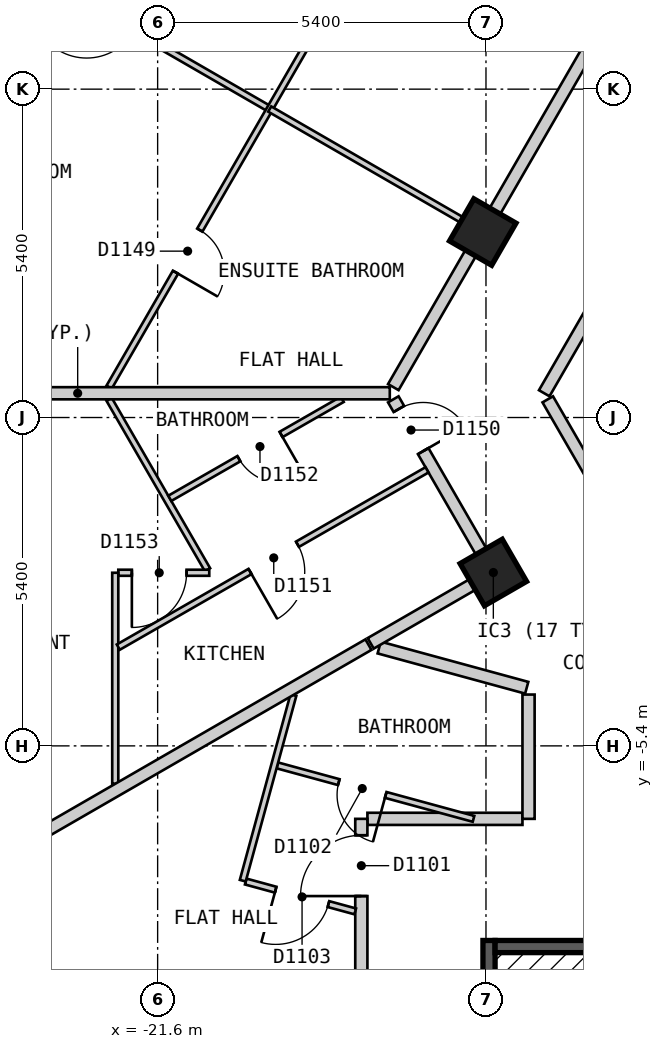
"""IFC4 building model, lengths in metres.
Left out: names, types, materials, properties, quantities, classifications, styles, units other than length and angle.
Written with IfcOpenShell. Run it as: python <this file> out.ifc"""

import sys

from ifc_helpers import new_model, si_unit, direction, frame, frame_2d, origin, origin_2d, place, context, subcontext, project, spatial, polyline, rectangle, outline, extrude, element, fill, save


model = new_model("IFC4")
c1 = context("Model", 3, precision=1e-05, world=origin(), true_north=direction((0.0, 1.0)))
c2 = subcontext(c1, "Body", "Model", "MODEL_VIEW")
j1 = project(units=[si_unit("LENGTHUNIT", "METRE"), si_unit("PLANEANGLEUNIT", "RADIAN")], contexts=[c1])
p1 = place(None, origin())
s1 = spatial("IfcSite", under=j1, at=p1, CompositionType="ELEMENT")
p2 = place(p1, origin())
s2 = spatial("IfcBuilding", under=s1, at=p2, CompositionType="ELEMENT")
p3 = place(p2, frame((0.0, 0.0, 144.6)))
s3 = spatial("IfcBuildingStorey", under=s2, at=p3, CompositionType="ELEMENT", Elevation=144.6)
for number, where, z_axis, x_axis in (
    (1, (-16.079, -2.549, 0.0), (0.0, 0.0, 1.0), (0.5, -0.866, 0.0)),
    (2, (-16.253, 3.05, 0.0), (0.0, 0.0, 1.0), (-0.5, -0.866, 0.0)),
):
    element("IfcColumn", number, at=place(p3, frame(where, z_axis=z_axis, x_axis=x_axis)), inside=s3, PredefinedType="COLUMN", context=c2, shape_type="SweptSolid", body=[
        extrude(rectangle(XDim=0.8, YDim=0.8, at=origin_2d()), origin(), (0.0, 0.0, 1.0), 3.0),
    ])
p4 = place(p3, frame((-16.555, 23.025, 0.0), z_axis=(0.0, 0.0, 1.0), x_axis=(-0.500020536353, -0.866013546791, 0.0)))
e3 = element("IfcWall", 3, at=p4, inside=s3, PredefinedType="SOLIDWALL", context=c2, shape_type="SweptSolid", body=[
    extrude(outline(polyline([(0.0, -0.15), (23.325, -0.15), (23.245, 0.15), (0.08, 0.15), (0.0, -0.15)])), origin(), (0.0, 0.0, 1.0), 2.7),
])
p5 = place(p4, frame((1.314, 0.0, 0.15)))
e4 = element("IfcOpeningElement", 4, at=p5, cuts=e3, PredefinedType="OPENING", context=c2, shape_type="SweptSolid", body=[
    extrude(rectangle(XDim=1.5, YDim=2.1, at=frame_2d((0.75, 1.05))), frame((0.0, 0.16, 0.0), z_axis=(0.0, -1.0, 0.0), x_axis=(1.0, 0.0, 0.0)), (0.0, 0.0, 1.0), 0.32),
])
p6 = place(p4, frame((4.056, 0.0, 0.15)))
e5 = element("IfcOpeningElement", 5, at=p6, cuts=e3, PredefinedType="OPENING", context=c2, shape_type="SweptSolid", body=[
    extrude(rectangle(XDim=1.5, YDim=2.1, at=frame_2d((0.75, 1.05))), frame((0.0, 0.16, 0.0), z_axis=(0.0, -1.0, 0.0), x_axis=(1.0, 0.0, 0.0)), (0.0, 0.0, 1.0), 0.32),
])
p7 = place(p4, frame((6.799, 0.0, 0.15)))
e6 = element("IfcOpeningElement", 6, at=p7, cuts=e3, PredefinedType="OPENING", context=c2, shape_type="SweptSolid", body=[
    extrude(rectangle(XDim=1.5, YDim=2.1, at=frame_2d((0.75, 1.05))), frame((0.0, 0.16, 0.0), z_axis=(0.0, -1.0, 0.0), x_axis=(1.0, 0.0, 0.0)), (0.0, 0.0, 1.0), 0.32),
])
p8 = place(p4, frame((9.541, 0.0, 0.15)))
e7 = element("IfcOpeningElement", 7, at=p8, cuts=e3, PredefinedType="OPENING", context=c2, shape_type="SweptSolid", body=[
    extrude(rectangle(XDim=1.5, YDim=2.1, at=frame_2d((0.75, 1.05))), frame((0.0, 0.16, 0.0), z_axis=(0.0, -1.0, 0.0), x_axis=(1.0, 0.0, 0.0)), (0.0, 0.0, 1.0), 0.32),
])
p9 = place(p4, frame((12.285, 0.0, 0.15)))
e8 = element("IfcOpeningElement", 8, at=p9, cuts=e3, PredefinedType="OPENING", context=c2, shape_type="SweptSolid", body=[
    extrude(rectangle(XDim=1.5, YDim=2.1, at=frame_2d((0.75, 1.05))), frame((0.0, 0.16, 0.0), z_axis=(0.0, -1.0, 0.0), x_axis=(1.0, 0.0, 0.0)), (0.0, 0.0, 1.0), 0.32),
])
p10 = place(p4, frame((15.027, 0.0, 0.15)))
e9 = element("IfcOpeningElement", 9, at=p10, cuts=e3, PredefinedType="OPENING", context=c2, shape_type="SweptSolid", body=[
    extrude(rectangle(XDim=1.5, YDim=2.1, at=frame_2d((0.75, 1.05))), frame((0.0, 0.16, 0.0), z_axis=(0.0, -1.0, 0.0), x_axis=(1.0, 0.0, 0.0)), (0.0, 0.0, 1.0), 0.32),
])
p11 = place(p4, frame((17.769, 0.0, 0.15)))
e10 = element("IfcOpeningElement", 10, at=p11, cuts=e3, PredefinedType="OPENING", context=c2, shape_type="SweptSolid", body=[
    extrude(rectangle(XDim=1.5, YDim=2.1, at=frame_2d((0.75, 1.05))), frame((0.0, 0.16, 0.0), z_axis=(0.0, -1.0, 0.0), x_axis=(1.0, 0.0, 0.0)), (0.0, 0.0, 1.0), 0.32),
])
p12 = place(p4, frame((20.512, 0.0, 0.15)))
e11 = element("IfcOpeningElement", 11, at=p12, cuts=e3, PredefinedType="OPENING", context=c2, shape_type="SweptSolid", body=[
    extrude(rectangle(XDim=1.5, YDim=2.1, at=frame_2d((0.75, 1.05))), frame((0.0, 0.16, 0.0), z_axis=(0.0, -1.0, 0.0), x_axis=(1.0, 0.0, 0.0)), (0.0, 0.0, 1.0), 0.32),
])
p13 = place(p3, frame((-28.218, -2.025, 0.0), z_axis=(0.0, 0.0, 1.0), x_axis=(0.500017503135, -0.866015298109, 0.0)))
e12 = element("IfcWall", 12, at=p13, inside=s3, PredefinedType="SOLIDWALL", context=c2, shape_type="SweptSolid", body=[
    extrude(outline(polyline([(0.0, -0.15), (24.711, -0.15), (24.631, 0.15), (0.08, 0.15), (0.0, -0.15)])), origin(), (0.0, 0.0, 1.0), 2.7),
])
p14 = place(p13, frame((1.4, 0.0, 0.15)))
e13 = element("IfcOpeningElement", 13, at=p14, cuts=e12, PredefinedType="OPENING", context=c2, shape_type="SweptSolid", body=[
    extrude(rectangle(XDim=1.5, YDim=2.1, at=frame_2d((0.75, 1.05))), frame((0.0, 0.16, 0.0), z_axis=(0.0, -1.0, 0.0), x_axis=(1.0, 0.0, 0.0)), (0.0, 0.0, 1.0), 0.32),
])
p15 = place(p13, frame((4.316, 0.0, 0.15)))
e14 = element("IfcOpeningElement", 14, at=p15, cuts=e12, PredefinedType="OPENING", context=c2, shape_type="SweptSolid", body=[
    extrude(rectangle(XDim=1.5, YDim=2.1, at=frame_2d((0.75, 1.05))), frame((0.0, 0.16, 0.0), z_axis=(0.0, -1.0, 0.0), x_axis=(1.0, 0.0, 0.0)), (0.0, 0.0, 1.0), 0.32),
])
p16 = place(p13, frame((7.231, 0.0, 0.15)))
e15 = element("IfcOpeningElement", 15, at=p16, cuts=e12, PredefinedType="OPENING", context=c2, shape_type="SweptSolid", body=[
    extrude(rectangle(XDim=1.5, YDim=2.1, at=frame_2d((0.75, 1.05))), frame((0.0, 0.16, 0.0), z_axis=(0.0, -1.0, 0.0), x_axis=(1.0, 0.0, 0.0)), (0.0, 0.0, 1.0), 0.32),
])
p17 = place(p13, frame((10.147, 0.0, 0.15)))
e16 = element("IfcOpeningElement", 16, at=p17, cuts=e12, PredefinedType="OPENING", context=c2, shape_type="SweptSolid", body=[
    extrude(rectangle(XDim=1.5, YDim=2.1, at=frame_2d((0.75, 1.05))), frame((0.0, 0.16, 0.0), z_axis=(0.0, -1.0, 0.0), x_axis=(1.0, 0.0, 0.0)), (0.0, 0.0, 1.0), 0.32),
])
p18 = place(p13, frame((13.062, 0.0, 0.15)))
e17 = element("IfcOpeningElement", 17, at=p18, cuts=e12, PredefinedType="OPENING", context=c2, shape_type="SweptSolid", body=[
    extrude(rectangle(XDim=1.5, YDim=2.1, at=frame_2d((0.75, 1.05))), frame((0.0, 0.16, 0.0), z_axis=(0.0, -1.0, 0.0), x_axis=(1.0, 0.0, 0.0)), (0.0, 0.0, 1.0), 0.32),
])
p19 = place(p13, frame((15.977, 0.0, 0.15)))
e18 = element("IfcOpeningElement", 18, at=p19, cuts=e12, PredefinedType="OPENING", context=c2, shape_type="SweptSolid", body=[
    extrude(rectangle(XDim=1.5, YDim=2.1, at=frame_2d((0.75, 1.05))), frame((0.0, 0.16, 0.0), z_axis=(0.0, -1.0, 0.0), x_axis=(1.0, 0.0, 0.0)), (0.0, 0.0, 1.0), 0.32),
])
p20 = place(p13, frame((18.893, 0.0, 0.15)))
e19 = element("IfcOpeningElement", 19, at=p20, cuts=e12, PredefinedType="OPENING", context=c2, shape_type="SweptSolid", body=[
    extrude(rectangle(XDim=1.5, YDim=2.1, at=frame_2d((0.75, 1.05))), frame((0.0, 0.16, 0.0), z_axis=(0.0, -1.0, 0.0), x_axis=(1.0, 0.0, 0.0)), (0.0, 0.0, 1.0), 0.32),
])
p21 = place(p13, frame((21.809, 0.0, 0.15)))
e20 = element("IfcOpeningElement", 20, at=p21, cuts=e12, PredefinedType="OPENING", context=c2, shape_type="SweptSolid", body=[
    extrude(rectangle(XDim=1.5, YDim=2.1, at=frame_2d((0.75, 1.05))), frame((0.0, 0.16, 0.0), z_axis=(0.0, -1.0, 0.0), x_axis=(1.0, 0.0, 0.0)), (0.0, 0.0, 1.0), 0.32),
])
p22 = place(p3, frame((-15.184, 0.299, 0.0), z_axis=(0.0, 0.0, 1.0), x_axis=(0.500149577091, -0.865939028186, 0.0)))
e21 = element("IfcWall", 21, at=p22, inside=s3, PredefinedType="PARTITIONING", context=c2, shape_type="SweptSolid", body=[
    extrude(rectangle(XDim=3.463, YDim=0.2, at=frame_2d((1.732, 0.0))), origin(), (0.0, 0.0, 1.0), 2.7),
])
p23 = place(p3, frame((-17.724, 0.299, 0.0), z_axis=(0.0, 0.0, 1.0), x_axis=(0.499910220442, -0.866077231832, 0.0)))
e22 = element("IfcWall", 22, at=p23, inside=s3, PredefinedType="PARTITIONING", context=c2, shape_type="SweptSolid", body=[
    extrude(rectangle(XDim=3.189, YDim=0.2, at=frame_2d((1.594, 0.0))), origin(), (0.0, 0.0, 1.0), 2.7),
])
p24 = place(p23, frame((0.183, 0.0, 0.0)))
e23 = element("IfcOpeningElement", 23, at=p24, cuts=e22, PredefinedType="OPENING", context=c2, shape_type="SweptSolid", body=[
    extrude(rectangle(XDim=0.8, YDim=2.1, at=frame_2d((0.4, 1.05))), frame((0.0, 0.11, 0.0), z_axis=(0.0, -1.0, 0.0), x_axis=(1.0, 0.0, 0.0)), (0.0, 0.0, 1.0), 0.22),
])
p25 = place(p3, frame((-18.15, -6.6, 0.0), z_axis=(0.0, 0.0, 1.0), x_axis=(1.0, 0.0, 0.0)))
e24 = element("IfcWall", 24, at=p25, inside=s3, PredefinedType="PARTITIONING", context=c2, shape_type="SweptSolid", body=[
    extrude(rectangle(XDim=2.55, YDim=0.2, at=frame_2d((1.275, 0.0))), origin(), (0.0, 0.0, 1.0), 2.7),
])
p26 = place(p3, frame((-15.242, 0.399, 0.0), z_axis=(0.0, 0.0, 1.0), x_axis=(0.499953615651, 0.866052182145, 0.0)))
e25 = element("IfcWall", 25, at=p26, inside=s3, PredefinedType="PARTITIONING", context=c2, shape_type="SweptSolid", body=[
    extrude(rectangle(XDim=8.777, YDim=0.2, at=frame_2d((4.388, 0.0))), origin(), (0.0, 0.0, 1.0), 2.7),
])
p27 = place(p26, frame((3.938, 0.0, 0.0)))
e26 = element("IfcOpeningElement", 26, at=p27, cuts=e25, PredefinedType="OPENING", context=c2, shape_type="SweptSolid", body=[
    extrude(rectangle(XDim=0.9, YDim=2.1, at=frame_2d((0.45, 1.05))), frame((0.0, 0.11, 0.0), z_axis=(0.0, -1.0, 0.0), x_axis=(1.0, 0.0, 0.0)), (0.0, 0.0, 1.0), 0.22),
])
p28 = place(p3, frame((-17.724, 0.5, 0.0), z_axis=(0.0, 0.0, 1.0), x_axis=(0.499992388462, 0.866029798263, 0.0)))
e27 = element("IfcWall", 27, at=p28, inside=s3, PredefinedType="PARTITIONING", context=c2, shape_type="SweptSolid", body=[
    extrude(rectangle(XDim=16.859, YDim=0.2, at=frame_2d((8.429, 0.0))), origin(), (0.0, 0.0, 1.0), 2.7),
])
p29 = place(p28, frame((10.672, 0.0, 0.0)))
e28 = element("IfcOpeningElement", 28, at=p29, cuts=e27, PredefinedType="OPENING", context=c2, shape_type="SweptSolid", body=[
    extrude(rectangle(XDim=1.0, YDim=2.1, at=frame_2d((0.5, 1.05))), frame((0.0, 0.11, 0.0), z_axis=(0.0, -1.0, 0.0), x_axis=(1.0, 0.0, 0.0)), (0.0, 0.0, 1.0), 0.22),
])
p30 = place(p3, frame((-15.5, -6.6, 0.0), z_axis=(0.0, 0.0, 1.0), x_axis=(0.0, 1.0, 0.0)))
e29 = element("IfcWall", 29, at=p30, inside=s3, PredefinedType="PARTITIONING", context=c2, shape_type="SweptSolid", body=[
    extrude(rectangle(XDim=2.044, YDim=0.2, at=frame_2d((1.022, 0.0))), origin(), (0.0, 0.0, 1.0), 2.7),
])
p31 = place(p3, frame((-18.25, -10.478, 0.0), z_axis=(0.0, 0.0, 1.0), x_axis=(0.0, 1.0, 0.0)))
e30 = element("IfcWall", 30, at=p31, inside=s3, PredefinedType="PARTITIONING", context=c2, shape_type="SweptSolid", body=[
    extrude(rectangle(XDim=3.878, YDim=0.2, at=frame_2d((1.939, 0.0))), origin(), (0.0, 0.0, 1.0), 2.7),
])
p32 = place(p31, frame((2.608, 0.0, 0.0)))
e31 = element("IfcOpeningElement", 31, at=p32, cuts=e30, PredefinedType="OPENING", context=c2, shape_type="SweptSolid", body=[
    extrude(rectangle(XDim=1.0, YDim=2.1, at=frame_2d((0.5, 1.05))), frame((0.0, 0.11, 0.0), z_axis=(0.0, -1.0, 0.0), x_axis=(1.0, 0.0, 0.0)), (0.0, 0.0, 1.0), 0.22),
])
p33 = place(p3, frame((-22.398, 0.299, 0.0), z_axis=(0.0, 0.0, 1.0), x_axis=(0.50004249738, -0.86600086652, 0.0)))
e32 = element("IfcWall", 32, at=p33, inside=s3, PredefinedType="PARTITIONING", context=c2, shape_type="SweptSolid", body=[
    extrude(rectangle(XDim=3.236, YDim=0.1, at=frame_2d((1.618, 0.0))), origin(), (0.0, 0.0, 1.0), 2.7),
])
p34 = place(p3, frame((-19.631, -5.721, 0.0), z_axis=(0.0, 0.0, 1.0), x_axis=(0.964816035809, -0.262925877475, 0.0)))
e33 = element("IfcWall", 33, at=p34, inside=s3, PredefinedType="PARTITIONING", context=c2, shape_type="SweptSolid", body=[
    extrude(rectangle(XDim=3.344, YDim=0.1, at=frame_2d((1.672, 0.0))), origin(), (0.0, 0.0, 1.0), 2.7),
])
p35 = place(p34, frame((1.047, 0.0, 0.0)))
e34 = element("IfcOpeningElement", 34, at=p35, cuts=e33, PredefinedType="OPENING", context=c2, shape_type="SweptSolid", body=[
    extrude(rectangle(XDim=0.8, YDim=2.1, at=frame_2d((0.4, 1.05))), frame((0.0, 0.06, 0.0), z_axis=(0.0, -1.0, 0.0), x_axis=(1.0, 0.0, 0.0)), (0.0, 0.0, 1.0), 0.12),
])
p36 = place(p3, frame((-20.151, -7.631, 0.0), z_axis=(0.0, 0.0, 1.0), x_axis=(0.964784947449, -0.263039930765, 0.0)))
e35 = element("IfcWall", 35, at=p36, inside=s3, PredefinedType="PARTITIONING", context=c2, shape_type="SweptSolid", body=[
    extrude(rectangle(XDim=1.866, YDim=0.1, at=frame_2d((0.933, 0.0))), origin(), (0.0, 0.0, 1.0), 2.7),
])
p37 = place(p36, frame((0.51, 0.0, 0.0)))
e36 = element("IfcOpeningElement", 36, at=p37, cuts=e35, PredefinedType="OPENING", context=c2, shape_type="SweptSolid", body=[
    extrude(rectangle(XDim=0.9, YDim=2.1, at=frame_2d((0.45, 1.05))), frame((0.0, 0.06, 0.0), z_axis=(0.0, -1.0, 0.0), x_axis=(1.0, 0.0, 0.0)), (0.0, 0.0, 1.0), 0.12),
])
p38 = place(p3, frame((-24.999, 8.1, 0.0), z_axis=(0.0, 0.0, 1.0), x_axis=(0.865978029808, -0.500082045158, 0.0)))
e37 = element("IfcWall", 37, at=p38, inside=s3, PredefinedType="PARTITIONING", context=c2, shape_type="SweptSolid", body=[
    extrude(rectangle(XDim=6.053, YDim=0.1, at=frame_2d((3.027, 0.0))), origin(), (0.0, 0.0, 1.0), 2.7),
])
p39 = place(p38, frame((2.577, 0.0, 0.0)))
e38 = element("IfcOpeningElement", 38, at=p39, cuts=e37, PredefinedType="OPENING", context=c2, shape_type="SweptSolid", body=[
    extrude(rectangle(XDim=0.9, YDim=2.1, at=frame_2d((0.45, 1.05))), frame((0.0, 0.06, 0.0), z_axis=(0.0, -1.0, 0.0), x_axis=(1.0, 0.0, 0.0)), (0.0, 0.0, 1.0), 0.12),
])
p40 = place(p3, frame((-22.247, -2.553, 0.0), z_axis=(0.0, 0.0, 1.0), x_axis=(1.0, 0.0, 0.0)))
e39 = element("IfcWall", 39, at=p40, inside=s3, PredefinedType="PARTITIONING", context=c2, shape_type="SweptSolid", body=[
    extrude(rectangle(XDim=1.496, YDim=0.1, at=frame_2d((0.748, 0.0))), origin(), (0.0, 0.0, 1.0), 2.7),
])
p41 = place(p40, frame((0.223, 0.0, 0.0)))
e40 = element("IfcOpeningElement", 40, at=p41, cuts=e39, PredefinedType="OPENING", context=c2, shape_type="SweptSolid", body=[
    extrude(rectangle(XDim=0.9, YDim=2.1, at=frame_2d((0.45, 1.05))), frame((0.0, 0.06, 0.0), z_axis=(0.0, -1.0, 0.0), x_axis=(1.0, 0.0, 0.0)), (0.0, 0.0, 1.0), 0.12),
])
p42 = place(p3, frame((-22.398, 0.499, 0.0), z_axis=(0.0, 0.0, 1.0), x_axis=(0.499981561717, 0.866036048871, 0.0)))
e41 = element("IfcWall", 41, at=p42, inside=s3, PredefinedType="PARTITIONING", context=c2, shape_type="SweptSolid", body=[
    extrude(rectangle(XDim=21.532, YDim=0.1, at=frame_2d((10.766, 0.0))), origin(), (0.0, 0.0, 1.0), 2.7),
])
p43 = place(p42, frame((13.049, 0.0, 0.0)))
e42 = element("IfcOpeningElement", 42, at=p43, cuts=e41, PredefinedType="OPENING", context=c2, shape_type="SweptSolid", body=[
    extrude(rectangle(XDim=0.9, YDim=2.1, at=frame_2d((0.45, 1.05))), frame((0.0, 0.06, 0.0), z_axis=(0.0, -1.0, 0.0), x_axis=(1.0, 0.0, 0.0)), (0.0, 0.0, 1.0), 0.12),
])
p44 = place(p42, frame((2.183, 0.0, 0.0)))
e43 = element("IfcOpeningElement", 43, at=p44, cuts=e41, PredefinedType="OPENING", context=c2, shape_type="SweptSolid", body=[
    extrude(rectangle(XDim=0.8, YDim=2.1, at=frame_2d((0.4, 1.05))), frame((0.0, 0.06, 0.0), z_axis=(0.0, -1.0, 0.0), x_axis=(1.0, 0.0, 0.0)), (0.0, 0.0, 1.0), 0.12),
])
p45 = place(p3, frame((-20.2, -7.617, 0.0), z_axis=(0.0, 0.0, 1.0), x_axis=(0.263150035392, 0.964754921663, 0.0)))
e44 = element("IfcWall", 44, at=p45, inside=s3, PredefinedType="PARTITIONING", context=c2, shape_type="SweptSolid", body=[
    extrude(rectangle(XDim=3.166, YDim=0.1, at=frame_2d((1.583, 0.0))), origin(), (0.0, 0.0, 1.0), 2.7),
])
p46 = place(p3, frame((-22.297, -6.023, 0.0), z_axis=(0.0, 0.0, 1.0), x_axis=(0.0, 1.0, 0.0)))
e45 = element("IfcWall", 45, at=p46, inside=s3, PredefinedType="PARTITIONING", context=c2, shape_type="SweptSolid", body=[
    extrude(rectangle(XDim=3.47, YDim=0.1, at=frame_2d((1.735, 0.0))), origin(), (0.0, 0.0, 1.0), 2.7),
])
p47 = place(p3, frame((-22.247, -3.776, 0.0), z_axis=(0.0, 0.0, 1.0), x_axis=(0.867243093247, 0.497884943752, 0.0)))
e46 = element("IfcWall", 46, at=p47, inside=s3, PredefinedType="PARTITIONING", context=c2, shape_type="SweptSolid", body=[
    extrude(rectangle(XDim=5.854, YDim=0.1, at=frame_2d((2.927, 0.0))), origin(), (0.0, 0.0, 1.0), 2.7),
])
p48 = place(p47, frame((2.498, 0.0, 0.0)))
e47 = element("IfcOpeningElement", 47, at=p48, cuts=e46, PredefinedType="OPENING", context=c2, shape_type="SweptSolid", body=[
    extrude(rectangle(XDim=0.9, YDim=2.1, at=frame_2d((0.45, 1.05))), frame((0.0, 0.06, 0.0), z_axis=(0.0, -1.0, 0.0), x_axis=(1.0, 0.0, 0.0)), (0.0, 0.0, 1.0), 0.12),
])
p49 = place(p3, frame((-21.4, -1.329, 0.0), z_axis=(0.0, 0.0, 1.0), x_axis=(0.867235187435, 0.497898714274, 0.0)))
e48 = element("IfcWall", 48, at=p49, inside=s3, PredefinedType="PARTITIONING", context=c2, shape_type="SweptSolid", body=[
    extrude(rectangle(XDim=3.27, YDim=0.1, at=frame_2d((1.635, 0.0))), origin(), (0.0, 0.0, 1.0), 2.7),
])
p50 = place(p49, frame((1.31, 0.0, 0.0)))
e49 = element("IfcOpeningElement", 49, at=p50, cuts=e48, PredefinedType="OPENING", context=c2, shape_type="SweptSolid", body=[
    extrude(rectangle(XDim=0.8, YDim=2.1, at=frame_2d((0.4, 1.05))), frame((0.0, 0.06, 0.0), z_axis=(0.0, -1.0, 0.0), x_axis=(1.0, 0.0, 0.0)), (0.0, 0.0, 1.0), 0.12),
])
p51 = place(p3, frame((-17.956, -3.783, 0.0), z_axis=(0.0, 0.0, 1.0), x_axis=(0.964815336827, -0.2629284424, 0.0)))
e50 = element("IfcWall", 50, at=p51, inside=s3, PredefinedType="PARTITIONING", context=c2, shape_type="SweptSolid", body=[
    extrude(rectangle(XDim=2.514, YDim=0.2, at=frame_2d((1.257, 0.0))), origin(), (0.0, 0.0, 1.0), 2.7),
])
p52 = place(p3, frame((-28.048, 0.399, 0.0), z_axis=(0.0, 0.0, 1.0), x_axis=(1.0, 0.0, 0.0)))
e51 = element("IfcWall", 51, at=p52, inside=s3, PredefinedType="PARTITIONING", context=c2, shape_type="SweptSolid", body=[
    extrude(rectangle(XDim=10.266, YDim=0.2, at=frame_2d((5.133, 0.0))), origin(), (0.0, 0.0, 1.0), 2.7),
])
p53 = place(p3, frame((-24.826, -7.599, 0.0), z_axis=(0.0, 0.0, 1.0), x_axis=(0.866031973572, 0.499988620622, 0.0)))
e52 = element("IfcWall", 52, at=p53, inside=s3, PredefinedType="PARTITIONING", context=c2, shape_type="SweptSolid", body=[
    extrude(rectangle(XDim=7.728, YDim=0.2, at=frame_2d((3.864, 0.0))), origin(), (0.0, 0.0, 1.0), 2.7),
])
p54 = place(p3, frame((-18.096, -3.714, 0.0), z_axis=(0.0, 0.0, 1.0), x_axis=(0.865794513859, 0.500399700011, 0.0)))
e53 = element("IfcWall", 53, at=p54, inside=s3, PredefinedType="PARTITIONING", context=c2, shape_type="SweptSolid", body=[
    extrude(rectangle(XDim=2.298, YDim=0.2, at=frame_2d((1.149, 0.0))), origin(), (0.0, 0.0, 1.0), 2.7),
])
p55 = place(p3, frame((-19.757, 5.073, 0.0), z_axis=(0.0, 0.0, 1.0), x_axis=(0.866076396086, -0.499911668341, 0.0)))
e54 = element("IfcWall", 54, at=p55, inside=s3, PredefinedType="PARTITIONING", context=c2, shape_type="SweptSolid", body=[
    extrude(rectangle(XDim=3.947, YDim=0.1, at=frame_2d((1.973, 0.0))), origin(), (0.0, 0.0, 1.0), 2.7),
])
p56 = place(p3, frame((-16.15, -14.4, 0.0), z_axis=(0.0, 0.0, 1.0), x_axis=(0.0, 1.0, 0.0)))
e55 = element("IfcWall", 55, at=p56, inside=s3, PredefinedType="SOLIDWALL", context=c2, shape_type="SweptSolid", body=[
    extrude(rectangle(XDim=5.8, YDim=0.2, at=frame_2d((2.9, 0.0))), origin(), (0.0, 0.0, 1.0), 2.7),
])
p57 = place(p3, frame((-16.05, -8.7, 0.0), z_axis=(0.0, 0.0, 1.0), x_axis=(1.0, 0.0, 0.0)))
e56 = element("IfcWall", 56, at=p57, inside=s3, PredefinedType="SOLIDWALL", context=c2, shape_type="SweptSolid", body=[
    extrude(rectangle(XDim=2.75, YDim=0.2, at=frame_2d((1.375, 0.0))), origin(), (0.0, 0.0, 1.0), 2.7),
])
p58 = place(p32, origin())
e57 = element("IfcDoor", 57, at=p58, inside=s3, OperationType="SINGLE_SWING_LEFT", PredefinedType="DOOR", context=c2, shape_type="SweptSolid", body=[
    extrude(rectangle(XDim=1.0, YDim=2.1, at=frame_2d((0.5, 1.05))), frame((0.0, 0.025, 0.0), z_axis=(0.0, -1.0, 0.0), x_axis=(1.0, 0.0, 0.0)), (0.0, 0.0, 1.0), 0.05),
])
fill(e31, e57)
p59 = place(p35, origin())
e58 = element("IfcDoor", 58, at=p59, inside=s3, OperationType="SINGLE_SWING_RIGHT", PredefinedType="DOOR", context=c2, shape_type="SweptSolid", body=[
    extrude(rectangle(XDim=0.8, YDim=2.1, at=frame_2d((0.4, 1.05))), frame((0.0, 0.025, 0.0), z_axis=(0.0, -1.0, 0.0), x_axis=(1.0, 0.0, 0.0)), (0.0, 0.0, 1.0), 0.05),
])
fill(e34, e58)
p60 = place(p37, origin())
e59 = element("IfcDoor", 59, at=p60, inside=s3, OperationType="SINGLE_SWING_LEFT", PredefinedType="DOOR", context=c2, shape_type="SweptSolid", body=[
    extrude(rectangle(XDim=0.9, YDim=2.1, at=frame_2d((0.45, 1.05))), frame((0.0, 0.025, 0.0), z_axis=(0.0, -1.0, 0.0), x_axis=(1.0, 0.0, 0.0)), (0.0, 0.0, 1.0), 0.05),
])
fill(e36, e59)
p61 = place(p44, origin())
e60 = element("IfcDoor", 60, at=p61, inside=s3, OperationType="SINGLE_SWING_LEFT", PredefinedType="DOOR", context=c2, shape_type="SweptSolid", body=[
    extrude(rectangle(XDim=0.8, YDim=2.1, at=frame_2d((0.4, 1.05))), frame((0.0, 0.025, 0.0), z_axis=(0.0, -1.0, 0.0), x_axis=(1.0, 0.0, 0.0)), (0.0, 0.0, 1.0), 0.05),
])
fill(e43, e60)
p62 = place(p24, origin())
e61 = element("IfcDoor", 61, at=p62, inside=s3, OperationType="SINGLE_SWING_RIGHT", PredefinedType="DOOR", context=c2, shape_type="SweptSolid", body=[
    extrude(rectangle(XDim=0.8, YDim=2.1, at=frame_2d((0.4, 1.05))), frame((0.0, 0.025, 0.0), z_axis=(0.0, -1.0, 0.0), x_axis=(1.0, 0.0, 0.0)), (0.0, 0.0, 1.0), 0.05),
])
fill(e23, e61)
p63 = place(p48, origin())
e62 = element("IfcDoor", 62, at=p63, inside=s3, OperationType="SINGLE_SWING_LEFT", PredefinedType="DOOR", context=c2, shape_type="SweptSolid", body=[
    extrude(rectangle(XDim=0.9, YDim=2.1, at=frame_2d((0.45, 1.05))), frame((0.0, 0.025, 0.0), z_axis=(0.0, -1.0, 0.0), x_axis=(1.0, 0.0, 0.0)), (0.0, 0.0, 1.0), 0.05),
])
fill(e47, e62)
p64 = place(p50, origin())
e63 = element("IfcDoor", 63, at=p64, inside=s3, OperationType="SINGLE_SWING_RIGHT", PredefinedType="DOOR", context=c2, shape_type="SweptSolid", body=[
    extrude(rectangle(XDim=0.8, YDim=2.1, at=frame_2d((0.4, 1.05))), frame((0.0, 0.025, 0.0), z_axis=(0.0, -1.0, 0.0), x_axis=(1.0, 0.0, 0.0)), (0.0, 0.0, 1.0), 0.05),
])
fill(e49, e63)
p65 = place(p41, origin())
e64 = element("IfcDoor", 64, at=p65, inside=s3, OperationType="SINGLE_SWING_LEFT", PredefinedType="DOOR", context=c2, shape_type="SweptSolid", body=[
    extrude(rectangle(XDim=0.9, YDim=2.1, at=frame_2d((0.45, 1.05))), frame((0.0, 0.025, 0.0), z_axis=(0.0, -1.0, 0.0), x_axis=(1.0, 0.0, 0.0)), (0.0, 0.0, 1.0), 0.05),
])
fill(e40, e64)
save(model, sys.argv[1])
